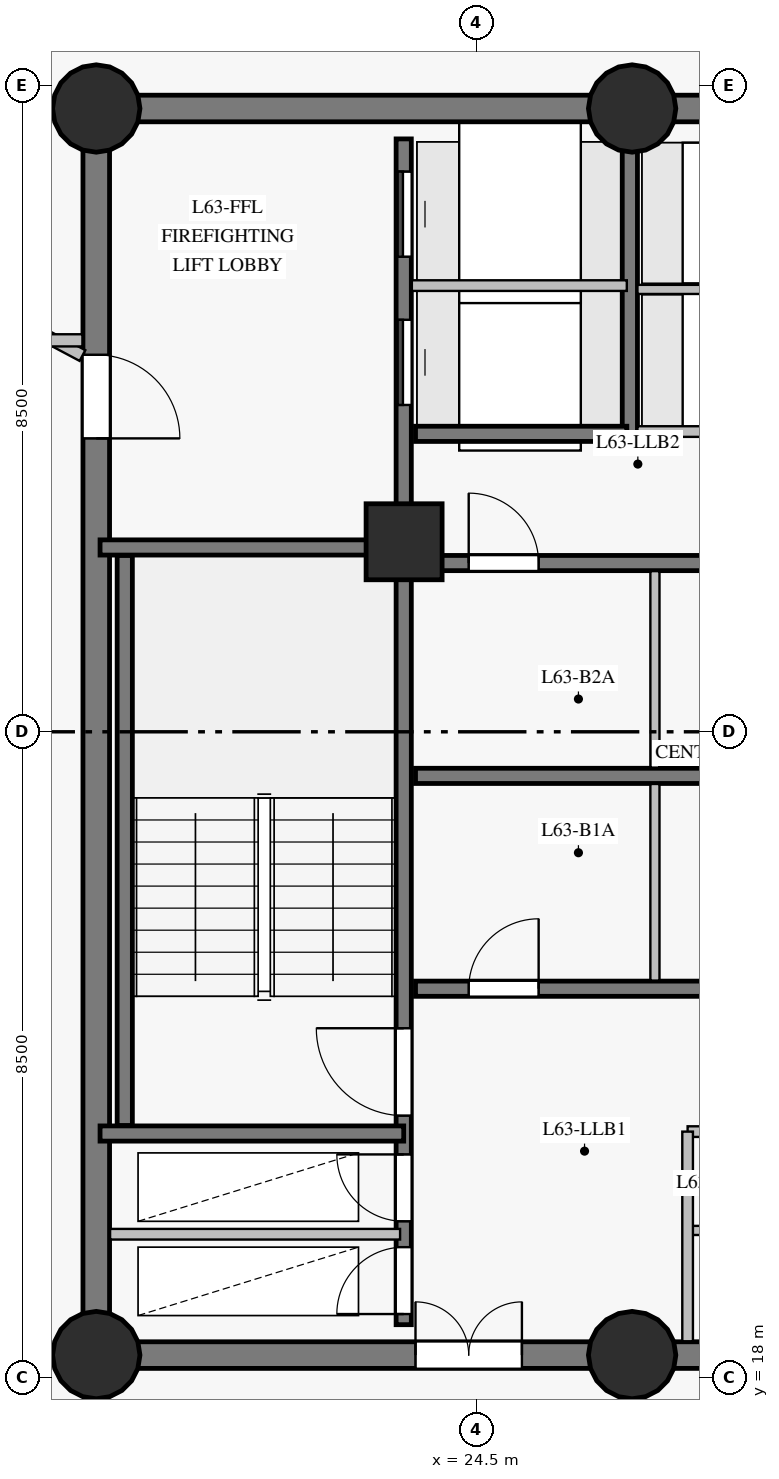
"""IFC4 building model, lengths in metres.
Left out: names, types, materials, properties, quantities, classifications, styles, units other than length and angle.
Written with IfcOpenShell. Run it as: python <this file> out.ifc"""

import sys

from ifc_helpers import new_model, si_unit, direction, frame, frame_2d, origin, origin_with_axes, origin_2d, place, context, subcontext, project, spatial, rectangle, circle, extrude, source, transform, mapped, element, fill, save


model = new_model("IFC4")
c1 = context("Model", 3, precision=1e-05, world=origin(), true_north=direction((0.0, 1.0)))
c2 = subcontext(c1, "Body", "Model", "MODEL_VIEW")
j1 = project(units=[si_unit("LENGTHUNIT", "METRE"), si_unit("PLANEANGLEUNIT", "RADIAN")], contexts=[c1])
p1 = place(None, origin())
s1 = spatial("IfcSite", under=j1, at=p1, CompositionType="ELEMENT")
p2 = place(p1, origin())
s2 = spatial("IfcBuilding", under=s1, at=p2, CompositionType="ELEMENT")
p3 = place(p2, frame((0.0, 0.0, 216.9)))
s3 = spatial("IfcBuildingStorey", under=s2, at=p3, CompositionType="ELEMENT", Elevation=216.9)
p4 = place(p3, frame((19.5, 18.3, 0.0), z_axis=(0.0, 0.0, 1.0), x_axis=(1.0, 0.0, 0.0)))
e1 = element("IfcWall", 1, at=p4, inside=s3, PredefinedType="SHEAR", context=c2, shape_type="SweptSolid", body=[
    extrude(rectangle(XDim=7.05, YDim=0.35, at=frame_2d((3.525, 0.0))), origin(), (0.0, 0.0, 1.0), 2.85),
])
p5 = place(p4, frame((4.2, 0.0, 0.0)))
e2 = element("IfcOpeningElement", 2, at=p5, cuts=e1, PredefinedType="OPENING", context=c2, shape_type="SweptSolid", body=[
    extrude(rectangle(XDim=1.4, YDim=2.2, at=frame_2d((0.7, 1.1))), frame((0.0, 0.185, 0.0), z_axis=(0.0, -1.0, 0.0), x_axis=(1.0, 0.0, 0.0)), (0.0, 0.0, 1.0), 0.37),
])
p6 = place(p3, frame((26.55, 18.3, 0.0), z_axis=(0.0, 0.0, 1.0), x_axis=(1.0, 0.0, 0.0)))
e3 = element("IfcWall", 3, at=p6, inside=s3, PredefinedType="SHEAR", context=c2, shape_type="SweptSolid", body=[
    extrude(rectangle(XDim=10.95, YDim=0.35, at=frame_2d((5.475, 0.0))), origin(), (0.0, 0.0, 1.0), 2.85),
])
p7 = place(p6, frame((4.55, 0.0, 0.0)))
e4 = element("IfcOpeningElement", 4, at=p7, cuts=e3, PredefinedType="OPENING", context=c2, shape_type="SweptSolid", body=[
    extrude(rectangle(XDim=1.4, YDim=2.2, at=frame_2d((0.7, 1.1))), frame((0.0, 0.185, 0.0), z_axis=(0.0, -1.0, 0.0), x_axis=(1.0, 0.0, 0.0)), (0.0, 0.0, 1.0), 0.37),
])
p8 = place(p3, frame((37.5, 34.7, 0.0), z_axis=(0.0, 0.0, 1.0), x_axis=(-1.0, 0.0, 0.0)))
e5 = element("IfcWall", 5, at=p8, inside=s3, PredefinedType="SHEAR", context=c2, shape_type="SweptSolid", body=[
    extrude(rectangle(XDim=10.95, YDim=0.35, at=frame_2d((5.475, 0.0))), origin(), (0.0, 0.0, 1.0), 2.85),
])
p9 = place(p8, frame((2.15, 0.0, 0.0)))
e6 = element("IfcOpeningElement", 6, at=p9, cuts=e5, PredefinedType="OPENING", context=c2, shape_type="SweptSolid", body=[
    extrude(rectangle(XDim=1.2, YDim=2.15, at=frame_2d((0.6, 1.075))), frame((0.0, 0.185, 0.0), z_axis=(0.0, -1.0, 0.0), x_axis=(1.0, 0.0, 0.0)), (0.0, 0.0, 1.0), 0.37),
])
p10 = place(p8, frame((6.35, 0.0, 0.0)))
e7 = element("IfcOpeningElement", 7, at=p10, cuts=e5, PredefinedType="OPENING", context=c2, shape_type="SweptSolid", body=[
    extrude(rectangle(XDim=1.1, YDim=2.15, at=frame_2d((0.55, 1.075))), frame((0.0, 0.185, 0.0), z_axis=(0.0, -1.0, 0.0), x_axis=(1.0, 0.0, 0.0)), (0.0, 0.0, 1.0), 0.37),
])
p11 = place(p3, frame((26.55, 34.7, 0.0), z_axis=(0.0, 0.0, 1.0), x_axis=(-1.0, 0.0, 0.0)))
e8 = element("IfcWall", 8, at=p11, inside=s3, PredefinedType="SHEAR", context=c2, shape_type="SweptSolid", body=[
    extrude(rectangle(XDim=7.05, YDim=0.35, at=frame_2d((3.525, 0.0))), origin(), (0.0, 0.0, 1.0), 2.85),
])
p12 = place(p3, frame((19.5, 34.7, 0.0), z_axis=(0.0, 0.0, 1.0), x_axis=(0.0, -1.0, 0.0)))
e9 = element("IfcWall", 9, at=p12, inside=s3, PredefinedType="SHEAR", context=c2, shape_type="SweptSolid", body=[
    extrude(rectangle(XDim=16.4, YDim=0.35, at=frame_2d((8.2, 0.0))), origin(), (0.0, 0.0, 1.0), 2.85),
])
p13 = place(p12, frame((3.24, 0.0, 0.0)))
e10 = element("IfcOpeningElement", 10, at=p13, cuts=e9, PredefinedType="OPENING", context=c2, shape_type="SweptSolid", body=[
    extrude(rectangle(XDim=1.1, YDim=2.15, at=frame_2d((0.55, 1.075))), frame((0.0, 0.185, 0.0), z_axis=(0.0, -1.0, 0.0), x_axis=(1.0, 0.0, 0.0)), (0.0, 0.0, 1.0), 0.37),
])
m1 = source(origin_with_axes(), c2, "Body", "SweptSolid", [
    extrude(circle(Radius=0.575, at=origin_2d()), origin(), (0.0, 0.0, 1.0), 3.05),
])
for number, where, z_axis, x_axis in (
    (11, (19.5, 18.3, 0.0), (0.0, 0.0, 1.0), (1.0, 0.0, 0.0)),
    (12, (26.55, 18.3, 0.0), (0.0, 0.0, 1.0), (1.0, 0.0, 0.0)),
    (13, (19.5, 34.7, 0.0), (0.0, 0.0, 1.0), (1.0, 0.0, 0.0)),
    (14, (26.55, 34.7, 0.0), (0.0, 0.0, 1.0), (1.0, 0.0, 0.0)),
):
    element("IfcColumn", number, at=place(p3, frame(where, z_axis=z_axis, x_axis=x_axis)), inside=s3, PredefinedType="COLUMN", context=c2, shape_type="MappedRepresentation", body=[
        mapped(m1, transform((0.0, 0.0, 0.0), scale=1.0)),
    ])
m2 = source(origin_with_axes(), c2, "Body", "SweptSolid", [
    extrude(rectangle(XDim=1.0, YDim=1.0, at=origin_2d()), origin(), (0.0, 0.0, 1.0), 3.05),
])
p14 = place(p3, frame((23.55, 29.0, 0.0), z_axis=(0.0, 0.0, 1.0), x_axis=(1.0, 0.0, 0.0)))
e15 = element("IfcColumn", 15, at=p14, inside=s3, PredefinedType="COLUMN", context=c2, shape_type="MappedRepresentation", body=[
    mapped(m2, transform((0.0, 0.0, 0.0), scale=1.0)),
])
p15 = place(p3, frame((23.545, 18.7, 0.0), z_axis=(0.0, 0.0, 1.0), x_axis=(0.0, 1.0, 0.0)))
e16 = element("IfcWall", 16, at=p15, inside=s3, PredefinedType="SHEAR", context=c2, shape_type="SweptSolid", body=[
    extrude(rectangle(XDim=15.6, YDim=0.2, at=frame_2d((7.8, 0.0))), origin(), (0.0, 0.0, 1.0), 2.85),
])
p16 = place(p15, frame((2.75, 0.0, 0.0)))
e17 = element("IfcOpeningElement", 17, at=p16, cuts=e16, PredefinedType="OPENING", context=c2, shape_type="SweptSolid", body=[
    extrude(rectangle(XDim=1.15, YDim=2.15, at=frame_2d((0.575, 1.075))), frame((0.0, 0.11, 0.0), z_axis=(0.0, -1.0, 0.0), x_axis=(1.0, 0.0, 0.0)), (0.0, 0.0, 1.0), 0.22),
])
p17 = place(p15, frame((0.14, 0.0, 0.0)))
e18 = element("IfcOpeningElement", 18, at=p17, cuts=e16, PredefinedType="OPENING", context=c2, shape_type="SweptSolid", body=[
    extrude(rectangle(XDim=0.88, YDim=2.1, at=frame_2d((0.44, 1.05))), frame((0.0, 0.11, 0.0), z_axis=(0.0, -1.0, 0.0), x_axis=(1.0, 0.0, 0.0)), (0.0, 0.0, 1.0), 0.22),
])
p18 = place(p15, frame((1.36, 0.0, 0.0)))
e19 = element("IfcOpeningElement", 19, at=p18, cuts=e16, PredefinedType="OPENING", context=c2, shape_type="SweptSolid", body=[
    extrude(rectangle(XDim=0.88, YDim=2.1, at=frame_2d((0.44, 1.05))), frame((0.0, 0.11, 0.0), z_axis=(0.0, -1.0, 0.0), x_axis=(1.0, 0.0, 0.0)), (0.0, 0.0, 1.0), 0.22),
])
p19 = place(p15, frame((12.1, 0.0, 0.0)))
e20 = element("IfcOpeningElement", 20, at=p19, cuts=e16, PredefinedType="OPENING", context=c2, shape_type="SweptSolid", body=[
    extrude(rectangle(XDim=1.12, YDim=2.15, at=frame_2d((0.56, 1.075))), frame((0.0, 0.11, 0.0), z_axis=(0.0, -1.0, 0.0), x_axis=(1.0, 0.0, 0.0)), (0.0, 0.0, 1.0), 0.22),
])
p20 = place(p15, frame((14.05, 0.0, 0.0)))
e21 = element("IfcOpeningElement", 21, at=p20, cuts=e16, PredefinedType="OPENING", context=c2, shape_type="SweptSolid", body=[
    extrude(rectangle(XDim=1.12, YDim=2.15, at=frame_2d((0.56, 1.075))), frame((0.0, 0.11, 0.0), z_axis=(0.0, -1.0, 0.0), x_axis=(1.0, 0.0, 0.0)), (0.0, 0.0, 1.0), 0.22),
])
p21 = place(p3, frame((23.7, 23.12, 0.0), z_axis=(0.0, 0.0, 1.0), x_axis=(1.0, 0.0, 0.0)))
e22 = element("IfcWall", 22, at=p21, inside=s3, PredefinedType="SHEAR", context=c2, shape_type="SweptSolid", body=[
    extrude(rectangle(XDim=9.6, YDim=0.2, at=frame_2d((4.8, 0.0))), origin(), (0.0, 0.0, 1.0), 2.85),
])
p22 = place(p21, frame((0.7, 0.0, 0.0)))
e23 = element("IfcOpeningElement", 23, at=p22, cuts=e22, PredefinedType="OPENING", context=c2, shape_type="SweptSolid", body=[
    extrude(rectangle(XDim=0.92, YDim=2.1, at=frame_2d((0.46, 1.05))), frame((0.0, 0.11, 0.0), z_axis=(0.0, -1.0, 0.0), x_axis=(1.0, 0.0, 0.0)), (0.0, 0.0, 1.0), 0.22),
])
p23 = place(p21, frame((4.2, 0.0, 0.0)))
e24 = element("IfcOpeningElement", 24, at=p23, cuts=e22, PredefinedType="OPENING", context=c2, shape_type="SweptSolid", body=[
    extrude(rectangle(XDim=0.92, YDim=2.1, at=frame_2d((0.46, 1.05))), frame((0.0, 0.11, 0.0), z_axis=(0.0, -1.0, 0.0), x_axis=(1.0, 0.0, 0.0)), (0.0, 0.0, 1.0), 0.22),
])
p24 = place(p21, frame((7.45, 0.0, 0.0)))
e25 = element("IfcOpeningElement", 25, at=p24, cuts=e22, PredefinedType="OPENING", context=c2, shape_type="SweptSolid", body=[
    extrude(rectangle(XDim=0.92, YDim=2.1, at=frame_2d((0.46, 1.05))), frame((0.0, 0.11, 0.0), z_axis=(0.0, -1.0, 0.0), x_axis=(1.0, 0.0, 0.0)), (0.0, 0.0, 1.0), 0.22),
])
p25 = place(p3, frame((23.7, 25.92, 0.0), z_axis=(0.0, 0.0, 1.0), x_axis=(1.0, 0.0, 0.0)))
e26 = element("IfcWall", 26, at=p25, inside=s3, PredefinedType="SHEAR", context=c2, shape_type="SweptSolid", body=[
    extrude(rectangle(XDim=9.6, YDim=0.2, at=frame_2d((4.8, 0.0))), origin(), (0.0, 0.0, 1.0), 2.85),
])
p26 = place(p3, frame((23.7, 28.72, 0.0), z_axis=(0.0, 0.0, 1.0), x_axis=(1.0, 0.0, 0.0)))
e27 = element("IfcWall", 27, at=p26, inside=s3, PredefinedType="SHEAR", context=c2, shape_type="SweptSolid", body=[
    extrude(rectangle(XDim=9.6, YDim=0.2, at=frame_2d((4.8, 0.0))), origin(), (0.0, 0.0, 1.0), 2.85),
])
p27 = place(p26, frame((0.7, 0.0, 0.0)))
e28 = element("IfcOpeningElement", 28, at=p27, cuts=e27, PredefinedType="OPENING", context=c2, shape_type="SweptSolid", body=[
    extrude(rectangle(XDim=0.92, YDim=2.1, at=frame_2d((0.46, 1.05))), frame((0.0, 0.11, 0.0), z_axis=(0.0, -1.0, 0.0), x_axis=(1.0, 0.0, 0.0)), (0.0, 0.0, 1.0), 0.22),
])
p28 = place(p26, frame((4.2, 0.0, 0.0)))
e29 = element("IfcOpeningElement", 29, at=p28, cuts=e27, PredefinedType="OPENING", context=c2, shape_type="SweptSolid", body=[
    extrude(rectangle(XDim=0.92, YDim=2.1, at=frame_2d((0.46, 1.05))), frame((0.0, 0.11, 0.0), z_axis=(0.0, -1.0, 0.0), x_axis=(1.0, 0.0, 0.0)), (0.0, 0.0, 1.0), 0.22),
])
p29 = place(p26, frame((7.45, 0.0, 0.0)))
e30 = element("IfcOpeningElement", 30, at=p29, cuts=e27, PredefinedType="OPENING", context=c2, shape_type="SweptSolid", body=[
    extrude(rectangle(XDim=0.92, YDim=2.1, at=frame_2d((0.46, 1.05))), frame((0.0, 0.11, 0.0), z_axis=(0.0, -1.0, 0.0), x_axis=(1.0, 0.0, 0.0)), (0.0, 0.0, 1.0), 0.22),
])
p30 = place(p3, frame((19.875, 21.32, 0.0), z_axis=(0.0, 0.0, 1.0), x_axis=(0.0, 1.0, 0.0)))
e31 = element("IfcWall", 31, at=p30, inside=s3, PredefinedType="SHEAR", context=c2, shape_type="SweptSolid", body=[
    extrude(rectangle(XDim=7.5, YDim=0.2, at=frame_2d((3.75, 0.0))), origin(), (0.0, 0.0, 1.0), 2.85),
])
for number, where, z_axis, x_axis in (
    (32, (19.55, 21.215, 0.0), (0.0, 0.0, 1.0), (1.0, 0.0, 0.0)),
    (33, (19.55, 28.925, 0.0), (0.0, 0.0, 1.0), (1.0, 0.0, 0.0)),
):
    element("IfcWall", number, at=place(p3, frame(where, z_axis=z_axis, x_axis=x_axis)), inside=s3, PredefinedType="SHEAR", context=c2, shape_type="SweptSolid", body=[
        extrude(rectangle(XDim=3.995, YDim=0.2, at=frame_2d((1.998, 0.0))), origin(), (0.0, 0.0, 1.0), 2.85),
    ])
p31 = place(p3, frame((26.52, 30.42, 0.0), z_axis=(0.0, 0.0, 1.0), x_axis=(0.0, 1.0, 0.0)))
e34 = element("IfcWall", 34, at=p31, inside=s3, PredefinedType="SHEAR", context=c2, shape_type="SweptSolid", body=[
    extrude(rectangle(XDim=3.86, YDim=0.2, at=frame_2d((1.93, 0.0))), origin(), (0.0, 0.0, 1.0), 2.85),
])
p32 = place(p3, frame((23.7, 30.42, 0.0), z_axis=(0.0, 0.0, 1.0), x_axis=(1.0, 0.0, 0.0)))
e35 = element("IfcWall", 35, at=p32, inside=s3, PredefinedType="SHEAR", context=c2, shape_type="SweptSolid", body=[
    extrude(rectangle(XDim=2.78, YDim=0.2, at=frame_2d((1.39, 0.0))), origin(), (0.0, 0.0, 1.0), 2.85),
])
p33 = place(p3, frame((19.319, 31.45, 0.0), z_axis=(0.0, 0.0, 1.0), x_axis=(-0.882947317061, 0.469472081485, 0.0)))
e36 = element("IfcWall", 36, at=p33, inside=s3, PredefinedType="PARTITIONING", context=c2, shape_type="SweptSolid", body=[
    extrude(rectangle(XDim=10.346, YDim=0.16, at=frame_2d((5.173, 0.0))), origin(), (0.0, 0.0, 1.0), 2.85),
])
p34 = place(p3, frame((19.682, 19.89, 0.0), z_axis=(0.0, 0.0, 1.0), x_axis=(1.0, 0.0, 0.0)))
e37 = element("IfcWall", 37, at=p34, inside=s3, PredefinedType="PARTITIONING", context=c2, shape_type="SweptSolid", body=[
    extrude(rectangle(XDim=3.815, YDim=0.14, at=frame_2d((1.908, 0.0))), origin(), (0.0, 0.0, 1.0), 2.85),
])
p35 = place(p3, frame((27.28, 21.24, 0.0), z_axis=(0.0, 0.0, 1.0), x_axis=(1.0, 0.0, 0.0)))
e38 = element("IfcWall", 38, at=p35, inside=s3, PredefinedType="PARTITIONING", context=c2, shape_type="SweptSolid", body=[
    extrude(rectangle(XDim=3.44, YDim=0.14, at=frame_2d((1.72, 0.0))), origin(), (0.0, 0.0, 1.0), 2.85),
])
p36 = place(p35, frame((1.15, 0.0, 0.0)))
e39 = element("IfcOpeningElement", 39, at=p36, cuts=e38, PredefinedType="OPENING", context=c2, shape_type="SweptSolid", body=[
    extrude(rectangle(XDim=0.92, YDim=2.1, at=frame_2d((0.46, 1.05))), frame((0.0, 0.08, 0.0), z_axis=(0.0, -1.0, 0.0), x_axis=(1.0, 0.0, 0.0)), (0.0, 0.0, 1.0), 0.16),
])
p37 = place(p3, frame((27.28, 19.94, 0.0), z_axis=(0.0, 0.0, 1.0), x_axis=(1.0, 0.0, 0.0)))
e40 = element("IfcWall", 40, at=p37, inside=s3, PredefinedType="PARTITIONING", context=c2, shape_type="SweptSolid", body=[
    extrude(rectangle(XDim=3.44, YDim=0.12, at=frame_2d((1.72, 0.0))), origin(), (0.0, 0.0, 1.0), 2.85),
])
p38 = place(p3, frame((23.652, 32.37, 0.0), z_axis=(0.0, 0.0, 1.0), x_axis=(1.0, 0.0, 0.0)))
e41 = element("IfcWall", 41, at=p38, inside=s3, PredefinedType="PARTITIONING", context=c2, shape_type="SweptSolid", body=[
    extrude(rectangle(XDim=2.828, YDim=0.14, at=frame_2d((1.414, 0.0))), origin(), (0.0, 0.0, 1.0), 2.85),
])
p39 = place(p3, frame((27.28, 18.482, 0.0), z_axis=(0.0, 0.0, 1.0), x_axis=(0.0, 1.0, 0.0)))
e42 = element("IfcWall", 42, at=p39, inside=s3, PredefinedType="PARTITIONING", context=c2, shape_type="SweptSolid", body=[
    extrude(rectangle(XDim=2.758, YDim=0.14, at=frame_2d((1.379, 0.0))), origin(), (0.0, 0.0, 1.0), 2.85),
])
p40 = place(p3, frame((26.62, 30.45, 0.0), z_axis=(0.0, 0.0, 1.0), x_axis=(1.0, 0.0, 0.0)))
e43 = element("IfcWall", 43, at=p40, inside=s3, PredefinedType="PARTITIONING", context=c2, shape_type="SweptSolid", body=[
    extrude(rectangle(XDim=2.58, YDim=0.14, at=frame_2d((1.29, 0.0))), origin(), (0.0, 0.0, 1.0), 2.85),
])
p41 = place(p3, frame((26.62, 32.32, 0.0), z_axis=(0.0, 0.0, 1.0), x_axis=(1.0, 0.0, 0.0)))
e44 = element("IfcWall", 44, at=p41, inside=s3, PredefinedType="PARTITIONING", context=c2, shape_type="SweptSolid", body=[
    extrude(rectangle(XDim=2.58, YDim=0.12, at=frame_2d((1.29, 0.0))), origin(), (0.0, 0.0, 1.0), 2.85),
])
p42 = place(p3, frame((16.75, 31.65, 0.0), z_axis=(0.0, 0.0, 1.0), x_axis=(1.0, 0.0, 0.0)))
e45 = element("IfcWall", 45, at=p42, inside=s3, PredefinedType="PARTITIONING", context=c2, shape_type="SweptSolid", body=[
    extrude(rectangle(XDim=2.568, YDim=0.16, at=frame_2d((1.284, 0.0))), origin(), (0.0, 0.0, 1.0), 2.85),
])
for number, where, z_axis, x_axis in (
    (46, (26.85, 23.227, 0.0), (0.0, 0.0, 1.0), (0.0, 1.0, 0.0)),
    (47, (26.85, 26.027, 0.0), (0.0, 0.0, 1.0), (0.0, 1.0, 0.0)),
):
    element("IfcWall", number, at=place(p3, frame(where, z_axis=z_axis, x_axis=x_axis)), inside=s3, PredefinedType="PARTITIONING", context=c2, shape_type="SweptSolid", body=[
        extrude(rectangle(XDim=2.587, YDim=0.12, at=frame_2d((1.293, 0.0))), origin(), (0.0, 0.0, 1.0), 2.85),
    ])
m3 = source(origin_with_axes(), c2, "Body", "SweptSolid", [
    extrude(rectangle(XDim=1.15, YDim=2.15, at=frame_2d((0.575, 1.075))), frame((0.0, 0.025, 0.0), z_axis=(0.0, -1.0, 0.0), x_axis=(1.0, 0.0, 0.0)), (0.0, 0.0, 1.0), 0.05),
])
p43 = place(p16, origin())
e48 = element("IfcDoor", 48, at=p43, inside=s3, OperationType="SINGLE_SWING_RIGHT", PredefinedType="DOOR", context=c2, shape_type="MappedRepresentation", body=[
    mapped(m3, transform((0.0, 0.0, 0.0), scale=1.0)),
])
fill(e17, e48)
m4 = source(origin_with_axes(), c2, "Body", "SweptSolid", [
    extrude(rectangle(XDim=1.1, YDim=2.15, at=frame_2d((0.55, 1.075))), frame((0.0, 0.025, 0.0), z_axis=(0.0, -1.0, 0.0), x_axis=(1.0, 0.0, 0.0)), (0.0, 0.0, 1.0), 0.05),
])
p44 = place(p13, origin())
e49 = element("IfcDoor", 49, at=p44, inside=s3, OperationType="SINGLE_SWING_RIGHT", PredefinedType="DOOR", context=c2, shape_type="MappedRepresentation", body=[
    mapped(m4, transform((0.0, 0.0, 0.0), scale=1.0)),
])
fill(e10, e49)
m5 = source(origin_with_axes(), c2, "Body", "SweptSolid", [
    extrude(rectangle(XDim=0.88, YDim=2.1, at=frame_2d((0.44, 1.05))), frame((0.0, 0.025, 0.0), z_axis=(0.0, -1.0, 0.0), x_axis=(1.0, 0.0, 0.0)), (0.0, 0.0, 1.0), 0.05),
])
p45 = place(p17, origin())
e50 = element("IfcDoor", 50, at=p45, inside=s3, OperationType="SINGLE_SWING_LEFT", PredefinedType="DOOR", context=c2, shape_type="MappedRepresentation", body=[
    mapped(m5, transform((0.0, 0.0, 0.0), scale=1.0)),
])
fill(e18, e50)
p46 = place(p18, origin())
e51 = element("IfcDoor", 51, at=p46, inside=s3, OperationType="SINGLE_SWING_RIGHT", PredefinedType="DOOR", context=c2, shape_type="MappedRepresentation", body=[
    mapped(m5, transform((0.0, 0.0, 0.0), scale=1.0)),
])
fill(e19, e51)
m6 = source(origin_with_axes(), c2, "Body", "SweptSolid", [
    extrude(rectangle(XDim=1.4, YDim=2.2, at=frame_2d((0.7, 1.1))), frame((0.0, 0.025, 0.0), z_axis=(0.0, -1.0, 0.0), x_axis=(1.0, 0.0, 0.0)), (0.0, 0.0, 1.0), 0.05),
])
p47 = place(p5, origin())
e52 = element("IfcDoor", 52, at=p47, inside=s3, OperationType="DOUBLE_DOOR_SINGLE_SWING", PredefinedType="DOOR", context=c2, shape_type="MappedRepresentation", body=[
    mapped(m6, transform((0.0, 0.0, 0.0), scale=1.0)),
])
fill(e2, e52)
m7 = source(origin_with_axes(), c2, "Body", "SweptSolid", [
    extrude(rectangle(XDim=0.92, YDim=2.1, at=frame_2d((0.46, 1.05))), frame((0.0, 0.025, 0.0), z_axis=(0.0, -1.0, 0.0), x_axis=(1.0, 0.0, 0.0)), (0.0, 0.0, 1.0), 0.05),
])
p48 = place(p22, origin())
e53 = element("IfcDoor", 53, at=p48, inside=s3, OperationType="SINGLE_SWING_RIGHT", PredefinedType="DOOR", context=c2, shape_type="MappedRepresentation", body=[
    mapped(m7, transform((0.0, 0.0, 0.0), scale=1.0)),
])
fill(e23, e53)
p49 = place(p27, origin())
e54 = element("IfcDoor", 54, at=p49, inside=s3, OperationType="SINGLE_SWING_LEFT", PredefinedType="DOOR", context=c2, shape_type="MappedRepresentation", body=[
    mapped(m7, transform((0.0, 0.0, 0.0), scale=1.0)),
])
fill(e28, e54)
m8 = source(origin_with_axes(), c2, "Body", "SweptSolid", [
    extrude(rectangle(XDim=1.12, YDim=2.15, at=frame_2d((0.56, 1.075))), frame((0.0, 0.025, 0.0), z_axis=(0.0, -1.0, 0.0), x_axis=(1.0, 0.0, 0.0)), (0.0, 0.0, 1.0), 0.05),
])
p50 = place(p19, origin())
e55 = element("IfcDoor", 55, at=p50, inside=s3, OperationType="SLIDING_TO_LEFT", PredefinedType="DOOR", context=c2, shape_type="MappedRepresentation", body=[
    mapped(m8, transform((0.0, 0.0, 0.0), scale=1.0)),
])
fill(e20, e55)
p51 = place(p20, origin())
e56 = element("IfcDoor", 56, at=p51, inside=s3, OperationType="SLIDING_TO_RIGHT", PredefinedType="DOOR", context=c2, shape_type="MappedRepresentation", body=[
    mapped(m8, transform((0.0, 0.0, 0.0), scale=1.0)),
])
fill(e21, e56)
save(model, sys.argv[1])
